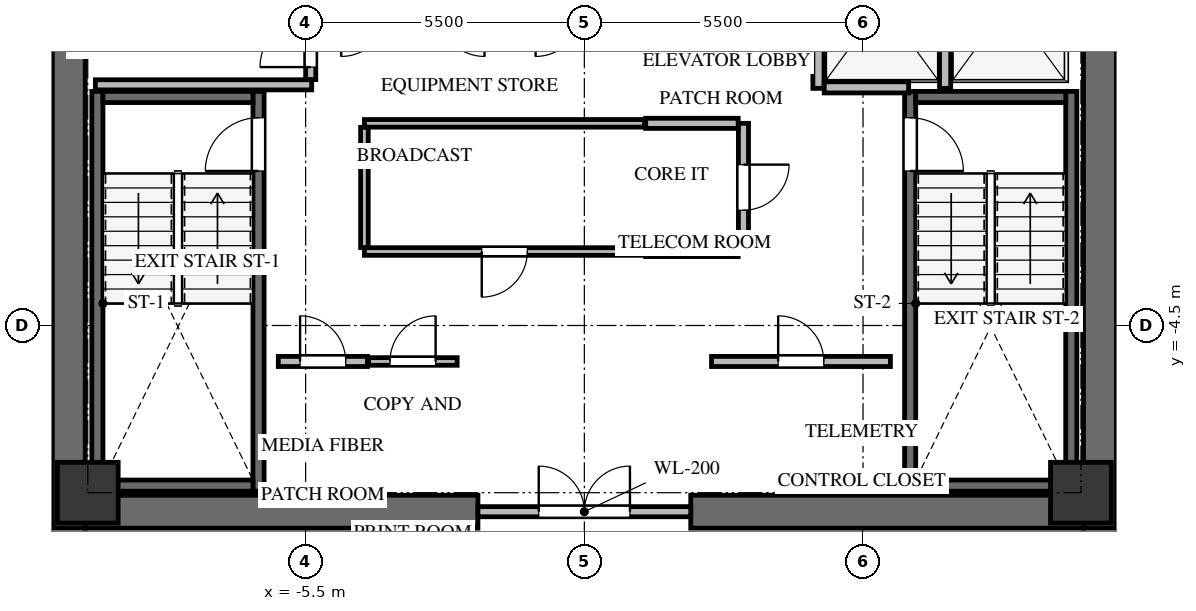
"""IFC4 building model, lengths in metres.
Left out: names, types, materials, properties, quantities, classifications, styles, units other than length and angle.
Written with IfcOpenShell. Run it as: python <this file> out.ifc"""

import sys

from ifc_helpers import new_model, si_unit, direction, frame, frame_2d, origin, origin_2d, place, context, subcontext, project, spatial, rectangle, extrude, source, transform, mapped, element, fill, save


model = new_model("IFC4")
c1 = context("Model", 3, precision=1e-05, world=origin(), true_north=direction((0.0, 1.0)))
c2 = subcontext(c1, "Body", "Model", "MODEL_VIEW")
j1 = project(units=[si_unit("LENGTHUNIT", "METRE"), si_unit("PLANEANGLEUNIT", "RADIAN")], contexts=[c1])
p1 = place(None, origin())
s1 = spatial("IfcSite", under=j1, at=p1, CompositionType="ELEMENT")
p2 = place(p1, origin())
s2 = spatial("IfcBuilding", under=s1, at=p2, CompositionType="ELEMENT")
p3 = place(p2, frame((0.0, 0.0, 177.1)))
s3 = spatial("IfcBuildingStorey", under=s2, at=p3, CompositionType="ELEMENT", Elevation=177.1)
for number, where, z_axis, x_axis in (
    (1, (-10.175, -8.5, 0.0), (0.0, 0.0, 1.0), (0.0, 1.0, 0.0)),
    (2, (10.175, -8.5, 0.0), (0.0, 0.0, 1.0), (0.0, 1.0, 0.0)),
):
    element("IfcWall", number, at=place(p3, frame(where, z_axis=z_axis, x_axis=x_axis)), inside=s3, PredefinedType="SHEAR", context=c2, shape_type="SweptSolid", body=[
        extrude(rectangle(XDim=17.0, YDim=0.65, at=frame_2d((8.5, 0.0))), origin(), (0.0, 0.0, 1.0), 3.3),
    ])
for number, where, z_axis, x_axis in (
    (3, (-9.85, -8.175, 0.0), (0.0, 0.0, 1.0), (1.0, 0.0, 0.0)),
    (4, (2.1, -8.175, 0.0), (0.0, 0.0, 1.0), (1.0, 0.0, 0.0)),
):
    element("IfcWall", number, at=place(p3, frame(where, z_axis=z_axis, x_axis=x_axis)), inside=s3, PredefinedType="SHEAR", context=c2, shape_type="SweptSolid", body=[
        extrude(rectangle(XDim=7.75, YDim=0.65, at=frame_2d((3.875, 0.0))), origin(), (0.0, 0.0, 1.0), 3.3),
    ])
p4 = place(p3, frame((-6.43, -7.77, -0.24), z_axis=(0.0, 0.0, 1.0), x_axis=(0.0, 1.0, 0.0)))
e5 = element("IfcWall", 5, at=p4, inside=s3, PredefinedType="SHEAR", context=c2, shape_type="SweptSolid", body=[
    extrude(rectangle(XDim=7.89, YDim=0.22, at=frame_2d((3.945, 0.0))), origin(), (0.0, 0.0, 1.0), 3.3),
])
p5 = place(p4, frame((6.32, 0.0, 0.0)))
e6 = element("IfcOpeningElement", 6, at=p5, cuts=e5, PredefinedType="OPENING", context=c2, shape_type="SweptSolid", body=[
    extrude(rectangle(XDim=1.05, YDim=2.15, at=frame_2d((0.525, 1.075))), frame((0.0, 0.12, 0.0), z_axis=(0.0, -1.0, 0.0), x_axis=(1.0, 0.0, 0.0)), (0.0, 0.0, 1.0), 0.24),
])
p6 = place(p3, frame((-9.61, 0.12, -0.24), z_axis=(0.0, 0.0, 1.0), x_axis=(0.0, -1.0, 0.0)))
e7 = element("IfcWall", 7, at=p6, inside=s3, PredefinedType="SHEAR", context=c2, shape_type="SweptSolid", body=[
    extrude(rectangle(XDim=7.89, YDim=0.22, at=frame_2d((3.945, 0.0))), origin(), (0.0, 0.0, 1.0), 3.3),
])
for number, where, z_axis, x_axis in (
    (8, (-9.5, -7.66, -0.24), (0.0, 0.0, 1.0), (1.0, 0.0, 0.0)),
    (9, (-6.54, 0.01, -0.24), (0.0, 0.0, 1.0), (-1.0, 0.0, 0.0)),
):
    element("IfcWall", number, at=place(p3, frame(where, z_axis=z_axis, x_axis=x_axis)), inside=s3, PredefinedType="SHEAR", context=c2, shape_type="SweptSolid", body=[
        extrude(rectangle(XDim=2.96, YDim=0.22, at=frame_2d((1.48, 0.0))), origin(), (0.0, 0.0, 1.0), 3.3),
    ])
p7 = place(p3, frame((9.61, -7.77, -0.24), z_axis=(0.0, 0.0, 1.0), x_axis=(0.0, 1.0, 0.0)))
e10 = element("IfcWall", 10, at=p7, inside=s3, PredefinedType="SHEAR", context=c2, shape_type="SweptSolid", body=[
    extrude(rectangle(XDim=7.89, YDim=0.22, at=frame_2d((3.945, 0.0))), origin(), (0.0, 0.0, 1.0), 3.3),
])
p8 = place(p3, frame((6.43, 0.12, -0.24), z_axis=(0.0, 0.0, 1.0), x_axis=(0.0, -1.0, 0.0)))
e11 = element("IfcWall", 11, at=p8, inside=s3, PredefinedType="SHEAR", context=c2, shape_type="SweptSolid", body=[
    extrude(rectangle(XDim=7.89, YDim=0.22, at=frame_2d((3.945, 0.0))), origin(), (0.0, 0.0, 1.0), 3.3),
])
p9 = place(p8, frame((0.52, 0.0, 0.0)))
e12 = element("IfcOpeningElement", 12, at=p9, cuts=e11, PredefinedType="OPENING", context=c2, shape_type="SweptSolid", body=[
    extrude(rectangle(XDim=1.05, YDim=2.15, at=frame_2d((0.525, 1.075))), frame((0.0, 0.12, 0.0), z_axis=(0.0, -1.0, 0.0), x_axis=(1.0, 0.0, 0.0)), (0.0, 0.0, 1.0), 0.24),
])
for number, where, z_axis, x_axis in (
    (13, (6.54, -7.66, -0.24), (0.0, 0.0, 1.0), (1.0, 0.0, 0.0)),
    (14, (9.5, 0.01, -0.24), (0.0, 0.0, 1.0), (-1.0, 0.0, 0.0)),
):
    element("IfcWall", number, at=place(p3, frame(where, z_axis=z_axis, x_axis=x_axis)), inside=s3, PredefinedType="SHEAR", context=c2, shape_type="SweptSolid", body=[
        extrude(rectangle(XDim=2.96, YDim=0.22, at=frame_2d((1.48, 0.0))), origin(), (0.0, 0.0, 1.0), 3.3),
    ])
m1 = source(origin(), c2, "Body", "SweptSolid", [
    extrude(rectangle(XDim=1.2, YDim=1.2, at=origin_2d()), origin(), (0.0, 0.0, 1.0), 3.3),
])
for number, where, z_axis, x_axis in (
    (15, (-9.8, -7.8, -0.24), (0.0, 0.0, 1.0), (1.0, 0.0, 0.0)),
    (16, (9.8, -7.8, -0.24), (0.0, 0.0, 1.0), (1.0, 0.0, 0.0)),
):
    element("IfcColumn", number, at=place(p3, frame(where, z_axis=z_axis, x_axis=x_axis)), inside=s3, PredefinedType="COLUMN", context=c2, shape_type="MappedRepresentation", body=[
        mapped(m1, transform((0.0, 0.0, 0.0), x_axis=(1.0, 0.0, 0.0), y_axis=(0.0, 1.0, 0.0), z_axis=(0.0, 0.0, 1.0), scale=1.0)),
    ])
p10 = place(p3, frame((-2.1, -8.175, 0.0), z_axis=(0.0, 0.0, 1.0), x_axis=(1.0, 0.0, 0.0)))
e17 = element("IfcWall", 17, at=p10, inside=s3, PredefinedType="SOLIDWALL", context=c2, shape_type="SweptSolid", body=[
    extrude(rectangle(XDim=4.2, YDim=0.2, at=frame_2d((2.1, 0.0))), origin(), (0.0, 0.0, 1.0), 3.045),
])
p11 = place(p10, frame((1.2, 0.0, 0.0)))
e18 = element("IfcOpeningElement", 18, at=p11, cuts=e17, PredefinedType="OPENING", context=c2, shape_type="SweptSolid", body=[
    extrude(rectangle(XDim=1.8, YDim=2.15, at=frame_2d((0.9, 1.075))), frame((0.0, 0.11, 0.0), z_axis=(0.0, -1.0, 0.0), x_axis=(1.0, 0.0, 0.0)), (0.0, 0.0, 1.0), 0.22),
])
p12 = place(p3, frame((-9.65, 0.25, 0.0), z_axis=(0.0, 0.0, 1.0), x_axis=(1.0, 0.0, 0.0)))
e19 = element("IfcWall", 19, at=p12, inside=s3, PredefinedType="SOLIDWALL", context=c2, shape_type="SweptSolid", body=[
    extrude(rectangle(XDim=4.27, YDim=0.2, at=frame_2d((2.135, 0.0))), origin(), (0.0, 0.0, 1.0), 3.045),
])
p13 = place(p3, frame((-5.4, 0.354, 0.0), z_axis=(0.0, 0.0, 1.0), x_axis=(0.0, 1.0, 0.0)))
e20 = element("IfcWall", 20, at=p13, inside=s3, PredefinedType="SOLIDWALL", context=c2, shape_type="SweptSolid", body=[
    extrude(rectangle(XDim=4.026, YDim=0.2, at=frame_2d((2.013, 0.0))), origin(), (0.0, 0.0, 1.0), 3.045),
])
p14 = place(p13, frame((0.246, 0.0, 0.0)))
e21 = element("IfcOpeningElement", 21, at=p14, cuts=e20, PredefinedType="OPENING", context=c2, shape_type="SweptSolid", body=[
    extrude(rectangle(XDim=1.0, YDim=2.15, at=frame_2d((0.5, 1.075))), frame((0.0, 0.11, 0.0), z_axis=(0.0, -1.0, 0.0), x_axis=(1.0, 0.0, 0.0)), (0.0, 0.0, 1.0), 0.22),
])
for number, where, z_axis, x_axis in (
    (22, (4.62, 0.18, 0.0), (0.0, 0.0, 1.0), (0.0, 1.0, 0.0)),
    (23, (7.12, 0.18, 0.0), (0.0, 0.0, 1.0), (0.0, 1.0, 0.0)),
):
    element("IfcWall", number, at=place(p3, frame(where, z_axis=z_axis, x_axis=x_axis)), inside=s3, PredefinedType="SOLIDWALL", context=c2, shape_type="SweptSolid", body=[
        extrude(rectangle(XDim=3.186, YDim=0.22, at=frame_2d((1.593, 0.0))), origin(), (0.0, 0.0, 1.0), 3.045),
    ])
p15 = place(p3, frame((4.734, 0.2, 0.0), z_axis=(0.0, 0.0, 1.0), x_axis=(1.0, 0.0, 0.0)))
e24 = element("IfcWall", 24, at=p15, inside=s3, PredefinedType="SOLIDWALL", context=c2, shape_type="SweptSolid", body=[
    extrude(rectangle(XDim=1.666, YDim=0.22, at=frame_2d((0.833, 0.0))), origin(), (0.0, 0.0, 1.0), 3.045),
])
p16 = place(p3, frame((-6.04, -5.21, 0.0), z_axis=(0.0, 0.0, 1.0), x_axis=(1.0, 0.0, 0.0)))
e25 = element("IfcWall", 25, at=p16, inside=s3, PredefinedType="SOLIDWALL", context=c2, shape_type="SweptSolid", body=[
    extrude(rectangle(XDim=1.76, YDim=0.2, at=frame_2d((0.88, 0.0))), origin(), (0.0, 0.0, 1.0), 3.045),
])
p17 = place(p16, frame((0.43, 0.0, 0.0)))
e26 = element("IfcOpeningElement", 26, at=p17, cuts=e25, PredefinedType="OPENING", context=c2, shape_type="SweptSolid", body=[
    extrude(rectangle(XDim=0.9, YDim=2.05, at=frame_2d((0.45, 1.025))), frame((0.0, 0.11, 0.0), z_axis=(0.0, -1.0, 0.0), x_axis=(1.0, 0.0, 0.0)), (0.0, 0.0, 1.0), 0.22),
])
p18 = place(p3, frame((-4.26, -5.21, 0.0), z_axis=(0.0, 0.0, 1.0), x_axis=(1.0, 0.0, 0.0)))
e27 = element("IfcWall", 27, at=p18, inside=s3, PredefinedType="PARTITIONING", context=c2, shape_type="SweptSolid", body=[
    extrude(rectangle(XDim=1.75, YDim=0.15, at=frame_2d((0.875, 0.0))), origin(), (0.0, 0.0, 1.0), 3.045),
])
p19 = place(p18, frame((0.425, 0.0, 0.0)))
e28 = element("IfcOpeningElement", 28, at=p19, cuts=e27, PredefinedType="OPENING", context=c2, shape_type="SweptSolid", body=[
    extrude(rectangle(XDim=0.9, YDim=2.05, at=frame_2d((0.45, 1.025))), frame((0.0, 0.085, 0.0), z_axis=(0.0, -1.0, 0.0), x_axis=(1.0, 0.0, 0.0)), (0.0, 0.0, 1.0), 0.17),
])
p20 = place(p3, frame((2.51, -5.21, 0.0), z_axis=(0.0, 0.0, 1.0), x_axis=(1.0, 0.0, 0.0)))
e29 = element("IfcWall", 29, at=p20, inside=s3, PredefinedType="SOLIDWALL", context=c2, shape_type="SweptSolid", body=[
    extrude(rectangle(XDim=3.53, YDim=0.2, at=frame_2d((1.765, 0.0))), origin(), (0.0, 0.0, 1.0), 3.045),
])
p21 = place(p20, frame((1.315, 0.0, 0.0)))
e30 = element("IfcOpeningElement", 30, at=p21, cuts=e29, PredefinedType="OPENING", context=c2, shape_type="SweptSolid", body=[
    extrude(rectangle(XDim=0.9, YDim=2.05, at=frame_2d((0.45, 1.025))), frame((0.0, 0.11, 0.0), z_axis=(0.0, -1.0, 0.0), x_axis=(1.0, 0.0, 0.0)), (0.0, 0.0, 1.0), 0.22),
])
p22 = place(p3, frame((1.19, -3.04, 0.0), z_axis=(0.0, 0.0, 1.0), x_axis=(-1.0, 0.0, 0.0)))
e31 = element("IfcWall", 31, at=p22, inside=s3, PredefinedType="PARTITIONING", context=c2, shape_type="SweptSolid", body=[
    extrude(rectangle(XDim=5.53, YDim=0.15, at=frame_2d((2.765, 0.0))), origin(), (0.0, 0.0, 1.0), 3.045),
])
p23 = place(p22, frame((2.315, 0.0, 0.0)))
e32 = element("IfcOpeningElement", 32, at=p23, cuts=e31, PredefinedType="OPENING", context=c2, shape_type="SweptSolid", body=[
    extrude(rectangle(XDim=0.9, YDim=2.05, at=frame_2d((0.45, 1.025))), frame((0.0, 0.085, 0.0), z_axis=(0.0, -1.0, 0.0), x_axis=(1.0, 0.0, 0.0)), (0.0, 0.0, 1.0), 0.17),
])
p24 = place(p3, frame((-4.34, -0.51, 0.0), z_axis=(0.0, 0.0, 1.0), x_axis=(1.0, 0.0, 0.0)))
e33 = element("IfcWall", 33, at=p24, inside=s3, PredefinedType="PARTITIONING", context=c2, shape_type="SweptSolid", body=[
    extrude(rectangle(XDim=5.53, YDim=0.15, at=frame_2d((2.765, 0.0))), origin(), (0.0, 0.0, 1.0), 3.045),
])
p25 = place(p3, frame((-4.34, -2.961, 0.0), z_axis=(0.0, 0.0, 1.0), x_axis=(0.0, 1.0, 0.0)))
e34 = element("IfcWall", 34, at=p25, inside=s3, PredefinedType="PARTITIONING", context=c2, shape_type="SweptSolid", body=[
    extrude(rectangle(XDim=2.372, YDim=0.15, at=frame_2d((1.186, 0.0))), origin(), (0.0, 0.0, 1.0), 3.045),
])
p26 = place(p3, frame((3.14, -0.51, 0.0), z_axis=(0.0, 0.0, 1.0), x_axis=(0.0, -1.0, 0.0)))
e35 = element("IfcWall", 35, at=p26, inside=s3, PredefinedType="SOLIDWALL", context=c2, shape_type="SweptSolid", body=[
    extrude(rectangle(XDim=2.53, YDim=0.2, at=frame_2d((1.265, 0.0))), origin(), (0.0, 0.0, 1.0), 3.045),
])
p27 = place(p26, frame((0.815, 0.0, 0.0)))
e36 = element("IfcOpeningElement", 36, at=p27, cuts=e35, PredefinedType="OPENING", context=c2, shape_type="SweptSolid", body=[
    extrude(rectangle(XDim=0.9, YDim=2.05, at=frame_2d((0.45, 1.025))), frame((0.0, 0.11, 0.0), z_axis=(0.0, -1.0, 0.0), x_axis=(1.0, 0.0, 0.0)), (0.0, 0.0, 1.0), 0.22),
])
for number, where, z_axis, x_axis in (
    (37, (3.036, -3.04, 0.0), (0.0, 0.0, 1.0), (-1.0, 0.0, 0.0)),
    (38, (1.21, -0.51, 0.0), (0.0, 0.0, 1.0), (1.0, 0.0, 0.0)),
):
    element("IfcWall", number, at=place(p3, frame(where, z_axis=z_axis, x_axis=x_axis)), inside=s3, PredefinedType="SOLIDWALL", context=c2, shape_type="SweptSolid", body=[
        extrude(rectangle(XDim=1.826, YDim=0.2, at=frame_2d((0.913, 0.0))), origin(), (0.0, 0.0, 1.0), 3.045),
    ])
m2 = source(origin(), c2, "Body", "SweptSolid", [
    extrude(rectangle(XDim=1.05, YDim=2.15, at=frame_2d((0.525, 1.075))), frame((0.0, 0.025, 0.0), z_axis=(0.0, -1.0, 0.0), x_axis=(1.0, 0.0, 0.0)), (0.0, 0.0, 1.0), 0.05),
])
p28 = place(p5, origin())
e39 = element("IfcDoor", 39, at=p28, inside=s3, OperationType="SINGLE_SWING_LEFT", PredefinedType="DOOR", context=c2, shape_type="MappedRepresentation", body=[
    mapped(m2, transform((0.0, 0.0, 0.0), x_axis=(1.0, 0.0, 0.0), y_axis=(0.0, 1.0, 0.0), z_axis=(0.0, 0.0, 1.0), scale=1.0)),
])
fill(e6, e39)
m3 = source(origin(), c2, "Body", "SweptSolid", [
    extrude(rectangle(XDim=1.05, YDim=2.15, at=frame_2d((0.525, 1.075))), frame((0.0, 0.025, 0.0), z_axis=(0.0, -1.0, 0.0), x_axis=(1.0, 0.0, 0.0)), (0.0, 0.0, 1.0), 0.05),
])
p29 = place(p9, origin())
e40 = element("IfcDoor", 40, at=p29, inside=s3, OperationType="SINGLE_SWING_RIGHT", PredefinedType="DOOR", context=c2, shape_type="MappedRepresentation", body=[
    mapped(m3, transform((0.0, 0.0, 0.0), x_axis=(1.0, 0.0, 0.0), y_axis=(0.0, 1.0, 0.0), z_axis=(0.0, 0.0, 1.0), scale=1.0)),
])
fill(e12, e40)
m4 = source(origin(), c2, "Body", "SweptSolid", [
    extrude(rectangle(XDim=1.8, YDim=2.15, at=frame_2d((0.9, 1.075))), frame((0.0, 0.025, 0.0), z_axis=(0.0, -1.0, 0.0), x_axis=(1.0, 0.0, 0.0)), (0.0, 0.0, 1.0), 0.05),
])
p30 = place(p11, origin())
e41 = element("IfcDoor", 41, at=p30, inside=s3, OperationType="DOUBLE_DOOR_SINGLE_SWING", PredefinedType="DOOR", context=c2, shape_type="MappedRepresentation", body=[
    mapped(m4, transform((0.0, 0.0, 0.0), x_axis=(1.0, 0.0, 0.0), y_axis=(0.0, 1.0, 0.0), z_axis=(0.0, 0.0, 1.0), scale=1.0)),
])
fill(e18, e41)
m5 = source(origin(), c2, "Body", "SweptSolid", [
    extrude(rectangle(XDim=1.0, YDim=2.15, at=frame_2d((0.5, 1.075))), frame((0.0, 0.025, 0.0), z_axis=(0.0, -1.0, 0.0), x_axis=(1.0, 0.0, 0.0)), (0.0, 0.0, 1.0), 0.05),
])
p31 = place(p14, origin())
e42 = element("IfcDoor", 42, at=p31, inside=s3, OperationType="SINGLE_SWING_LEFT", PredefinedType="DOOR", context=c2, shape_type="MappedRepresentation", body=[
    mapped(m5, transform((0.0, 0.0, 0.0), x_axis=(1.0, 0.0, 0.0), y_axis=(0.0, 1.0, 0.0), z_axis=(0.0, 0.0, 1.0), scale=1.0)),
])
fill(e21, e42)
m6 = source(origin(), c2, "Body", "SweptSolid", [
    extrude(rectangle(XDim=0.9, YDim=2.05, at=frame_2d((0.45, 1.025))), frame((0.0, 0.025, 0.0), z_axis=(0.0, -1.0, 0.0), x_axis=(1.0, 0.0, 0.0)), (0.0, 0.0, 1.0), 0.05),
])
p32 = place(p17, origin())
e43 = element("IfcDoor", 43, at=p32, inside=s3, OperationType="SINGLE_SWING_LEFT", PredefinedType="DOOR", context=c2, shape_type="MappedRepresentation", body=[
    mapped(m6, transform((0.0, 0.0, 0.0), x_axis=(1.0, 0.0, 0.0), y_axis=(0.0, 1.0, 0.0), z_axis=(0.0, 0.0, 1.0), scale=1.0)),
])
fill(e26, e43)
m7 = source(origin(), c2, "Body", "SweptSolid", [
    extrude(rectangle(XDim=0.9, YDim=2.05, at=frame_2d((0.45, 1.025))), frame((0.0, 0.025, 0.0), z_axis=(0.0, -1.0, 0.0), x_axis=(1.0, 0.0, 0.0)), (0.0, 0.0, 1.0), 0.05),
])
p33 = place(p19, origin())
e44 = element("IfcDoor", 44, at=p33, inside=s3, OperationType="SINGLE_SWING_RIGHT", PredefinedType="DOOR", context=c2, shape_type="MappedRepresentation", body=[
    mapped(m7, transform((0.0, 0.0, 0.0), x_axis=(1.0, 0.0, 0.0), y_axis=(0.0, 1.0, 0.0), z_axis=(0.0, 0.0, 1.0), scale=1.0)),
])
fill(e28, e44)
p34 = place(p21, origin())
e45 = element("IfcDoor", 45, at=p34, inside=s3, OperationType="SINGLE_SWING_LEFT", PredefinedType="DOOR", context=c2, shape_type="MappedRepresentation", body=[
    mapped(m6, transform((0.0, 0.0, 0.0), x_axis=(1.0, 0.0, 0.0), y_axis=(0.0, 1.0, 0.0), z_axis=(0.0, 0.0, 1.0), scale=1.0)),
])
fill(e30, e45)
p35 = place(p23, origin())
e46 = element("IfcDoor", 46, at=p35, inside=s3, OperationType="SINGLE_SWING_RIGHT", PredefinedType="DOOR", context=c2, shape_type="MappedRepresentation", body=[
    mapped(m7, transform((0.0, 0.0, 0.0), x_axis=(1.0, 0.0, 0.0), y_axis=(0.0, 1.0, 0.0), z_axis=(0.0, 0.0, 1.0), scale=1.0)),
])
fill(e32, e46)
p36 = place(p27, origin())
e47 = element("IfcDoor", 47, at=p36, inside=s3, OperationType="SINGLE_SWING_LEFT", PredefinedType="DOOR", context=c2, shape_type="MappedRepresentation", body=[
    mapped(m6, transform((0.0, 0.0, 0.0), x_axis=(1.0, 0.0, 0.0), y_axis=(0.0, 1.0, 0.0), z_axis=(0.0, 0.0, 1.0), scale=1.0)),
])
fill(e36, e47)
save(model, sys.argv[1])
